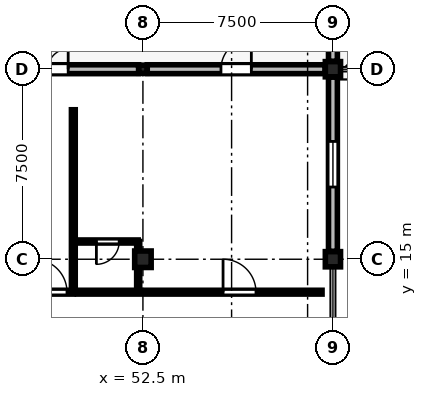
"""IFC4 building model, lengths in metres.
Left out: names, types, materials, properties, quantities, classifications, styles, units other than length and angle.
Written with IfcOpenShell. Run it as: python <this file> out.ifc"""

import sys

from ifc_helpers import new_model, si_unit, direction, frame, frame_2d, origin, origin_2d, place, context, subcontext, project, spatial, rectangle, extrude, element, fill, save


model = new_model("IFC4")
c1 = context("Model", 3, precision=1e-05, world=origin(), true_north=direction((0.0, 1.0)))
c2 = subcontext(c1, "Body", "Model", "MODEL_VIEW")
j1 = project(units=[si_unit("LENGTHUNIT", "METRE"), si_unit("PLANEANGLEUNIT", "RADIAN")], contexts=[c1])
p1 = place(None, origin())
s1 = spatial("IfcSite", under=j1, at=p1, CompositionType="ELEMENT")
p2 = place(p1, origin())
s2 = spatial("IfcBuilding", under=s1, at=p2, CompositionType="ELEMENT")
p3 = place(p2, frame((0.0, 0.0, 9.3)))
s3 = spatial("IfcBuildingStorey", under=s2, at=p3, CompositionType="ELEMENT", Elevation=9.3)
p4 = place(p3, frame((52.5, 15.0, 0.0), z_axis=(0.0, 0.0, 1.0), x_axis=(1.0, 0.0, 0.0)))
e1 = element("IfcColumn", 1, at=p4, inside=s3, PredefinedType="COLUMN", context=c2, shape_type="SweptSolid", body=[
    extrude(rectangle(XDim=0.65, YDim=0.65, at=origin_2d()), origin(), (0.0, 0.0, 1.0), 4.8),
])
p5 = place(p3, frame((52.5, 22.5, 0.0), z_axis=(0.0, 0.0, 1.0), x_axis=(1.0, 0.0, 0.0)))
e2 = element("IfcColumn", 2, at=p5, inside=s3, PredefinedType="COLUMN", context=c2, shape_type="SweptSolid", body=[
    extrude(rectangle(XDim=0.32, YDim=0.32, at=origin_2d()), origin(), (0.0, 0.0, 1.0), 4.8),
])
for number, where, z_axis, x_axis in (
    (3, (60.0, 15.0, 0.0), (0.0, 0.0, 1.0), (1.0, 0.0, 0.0)),
    (4, (60.0, 22.5, 0.0), (0.0, 0.0, 1.0), (1.0, 0.0, 0.0)),
):
    element("IfcColumn", number, at=place(p3, frame(where, z_axis=z_axis, x_axis=x_axis)), inside=s3, PredefinedType="COLUMN", context=c2, shape_type="SweptSolid", body=[
        extrude(rectangle(XDim=0.6, YDim=0.6, at=origin_2d()), origin(), (0.0, 0.0, 1.0), 4.8),
    ])
p6 = place(p3, frame((45.17, 22.5, 0.0), z_axis=(0.0, 0.0, 1.0), x_axis=(1.0, 0.0, 0.0)))
e5 = element("IfcWall", 5, at=p6, inside=s3, PredefinedType="STANDARD", context=c2, shape_type="SweptSolid", body=[
    extrude(rectangle(XDim=7.16, YDim=0.35, at=frame_2d((3.58, 0.0))), origin(), (0.0, 0.0, 1.0), 3.95),
])
p7 = place(p6, frame((2.78, 0.0, 0.0)))
e6 = element("IfcOpeningElement", 6, at=p7, cuts=e5, PredefinedType="OPENING", context=c2, shape_type="SweptSolid", body=[
    extrude(rectangle(XDim=1.6, YDim=2.35, at=frame_2d((0.8, 1.175))), frame((0.0, 0.185, 0.0), z_axis=(0.0, -1.0, 0.0), x_axis=(1.0, 0.0, 0.0)), (0.0, 0.0, 1.0), 0.37),
])
p8 = place(p3, frame((52.67, 22.5, 0.0), z_axis=(0.0, 0.0, 1.0), x_axis=(1.0, 0.0, 0.0)))
e7 = element("IfcWall", 7, at=p8, inside=s3, PredefinedType="STANDARD", context=c2, shape_type="SweptSolid", body=[
    extrude(rectangle(XDim=7.02, YDim=0.35, at=frame_2d((3.51, 0.0))), origin(), (0.0, 0.0, 1.0), 3.95),
])
p9 = place(p8, frame((2.91, 0.0, 0.0)))
e8 = element("IfcOpeningElement", 8, at=p9, cuts=e7, PredefinedType="OPENING", context=c2, shape_type="SweptSolid", body=[
    extrude(rectangle(XDim=1.2, YDim=2.3, at=frame_2d((0.6, 1.15))), frame((0.0, 0.185, 0.0), z_axis=(0.0, -1.0, 0.0), x_axis=(1.0, 0.0, 0.0)), (0.0, 0.0, 1.0), 0.37),
])
p10 = place(p3, frame((60.0, 22.19, 0.0), z_axis=(0.0, 0.0, 1.0), x_axis=(0.0, -1.0, 0.0)))
e9 = element("IfcWall", 9, at=p10, inside=s3, PredefinedType="STANDARD", context=c2, shape_type="SweptSolid", body=[
    extrude(rectangle(XDim=6.88, YDim=0.35, at=frame_2d((3.44, 0.0))), origin(), (0.0, 0.0, 1.0), 3.95),
])
p11 = place(p10, frame((2.54, 0.0, 0.9)))
e10 = element("IfcOpeningElement", 10, at=p11, cuts=e9, PredefinedType="OPENING", context=c2, shape_type="SweptSolid", body=[
    extrude(rectangle(XDim=1.8, YDim=2.4, at=frame_2d((0.9, 1.2))), frame((0.0, 0.185, 0.0), z_axis=(0.0, -1.0, 0.0), x_axis=(1.0, 0.0, 0.0)), (0.0, 0.0, 1.0), 0.37),
])
p12 = place(p3, frame((60.0, 22.81, 0.0), z_axis=(0.0, 0.0, 1.0), x_axis=(0.0, 1.0, 0.0)))
e11 = element("IfcWall", 11, at=p12, inside=s3, PredefinedType="STANDARD", context=c2, shape_type="SweptSolid", body=[
    extrude(rectangle(XDim=8.5, YDim=0.35, at=frame_2d((4.25, 0.0))), origin(), (0.0, 0.0, 1.0), 4.55),
])
p13 = place(p12, frame((3.45, 0.0, 0.0)))
e12 = element("IfcOpeningElement", 12, at=p13, cuts=e11, PredefinedType="OPENING", context=c2, shape_type="SweptSolid", body=[
    extrude(rectangle(XDim=1.6, YDim=2.35, at=frame_2d((0.8, 1.175))), frame((0.0, 0.185, 0.0), z_axis=(0.0, -1.0, 0.0), x_axis=(1.0, 0.0, 0.0)), (0.0, 0.0, 1.0), 0.37),
])
p14 = place(p3, frame((40.097, 13.7, 0.0), z_axis=(0.0, 0.0, 1.0), x_axis=(1.0, 0.0, 0.0)))
e13 = element("IfcWall", 13, at=p14, inside=s3, PredefinedType="PARTITIONING", context=c2, shape_type="SweptSolid", body=[
    extrude(rectangle(XDim=9.657, YDim=0.15, at=frame_2d((4.828, 0.0))), origin(), (0.0, 0.0, 1.0), 4.535),
])
p15 = place(p14, frame((8.107, 0.0, 0.0)))
e14 = element("IfcOpeningElement", 14, at=p15, cuts=e13, PredefinedType="OPENING", context=c2, shape_type="SweptSolid", body=[
    extrude(rectangle(XDim=1.3, YDim=2.2, at=frame_2d((0.65, 1.1))), frame((0.0, 0.085, 0.0), z_axis=(0.0, -1.0, 0.0), x_axis=(1.0, 0.0, 0.0)), (0.0, 0.0, 1.0), 0.17),
])
p16 = place(p3, frame((49.913, 13.7, 0.0), z_axis=(0.0, 0.0, 1.0), x_axis=(1.0, 0.0, 0.0)))
e15 = element("IfcWall", 15, at=p16, inside=s3, PredefinedType="PARTITIONING", context=c2, shape_type="SweptSolid", body=[
    extrude(rectangle(XDim=9.657, YDim=0.15, at=frame_2d((4.828, 0.0))), origin(), (0.0, 0.0, 1.0), 4.535),
])
p17 = place(p16, frame((5.75, 0.0, 0.0)))
e16 = element("IfcOpeningElement", 16, at=p17, cuts=e15, PredefinedType="OPENING", context=c2, shape_type="SweptSolid", body=[
    extrude(rectangle(XDim=1.3, YDim=2.2, at=frame_2d((0.65, 1.1))), frame((0.0, 0.085, 0.0), z_axis=(0.0, -1.0, 0.0), x_axis=(1.0, 0.0, 0.0)), (0.0, 0.0, 1.0), 0.17),
])
p18 = place(p3, frame((52.313, 15.7, 0.0), z_axis=(0.0, 0.0, 1.0), x_axis=(-1.0, 0.0, 0.0)))
e17 = element("IfcWall", 17, at=p18, inside=s3, PredefinedType="PARTITIONING", context=c2, shape_type="SweptSolid", body=[
    extrude(rectangle(XDim=2.4, YDim=0.12, at=frame_2d((1.2, 0.0))), origin(), (0.0, 0.0, 1.0), 4.535),
])
p19 = place(p18, frame((0.75, 0.0, 0.0)))
e18 = element("IfcOpeningElement", 18, at=p19, cuts=e17, PredefinedType="OPENING", context=c2, shape_type="SweptSolid", body=[
    extrude(rectangle(XDim=0.9, YDim=2.1, at=frame_2d((0.45, 1.05))), frame((0.0, 0.07, 0.0), z_axis=(0.0, -1.0, 0.0), x_axis=(1.0, 0.0, 0.0)), (0.0, 0.0, 1.0), 0.14),
])
p20 = place(p3, frame((52.313, 13.7, 0.0), z_axis=(0.0, 0.0, 1.0), x_axis=(0.0, 1.0, 0.0)))
e19 = element("IfcWall", 19, at=p20, inside=s3, PredefinedType="PARTITIONING", context=c2, shape_type="SweptSolid", body=[
    extrude(rectangle(XDim=2.0, YDim=0.12, at=frame_2d((1.0, 0.0))), origin(), (0.0, 0.0, 1.0), 3.985),
])
p21 = place(p3, frame((49.753, 13.7, 0.0), z_axis=(0.0, 0.0, 1.0), x_axis=(0.0, 1.0, 0.0)))
e20 = element("IfcWall", 20, at=p21, inside=s3, PredefinedType="PARTITIONING", context=c2, shape_type="SweptSolid", body=[
    extrude(rectangle(XDim=7.2, YDim=0.15, at=frame_2d((3.6, 0.0))), origin(), (0.0, 0.0, 1.0), 4.535),
])
p22 = place(p7, origin())
e21 = element("IfcDoor", 21, at=p22, inside=s3, OperationType="DOUBLE_DOOR_SINGLE_SWING", PredefinedType="DOOR", context=c2, shape_type="SweptSolid", body=[
    extrude(rectangle(XDim=1.6, YDim=2.35, at=frame_2d((0.8, 1.175))), frame((0.0, 0.025, 0.0), z_axis=(0.0, -1.0, 0.0), x_axis=(1.0, 0.0, 0.0)), (0.0, 0.0, 1.0), 0.05),
])
fill(e6, e21)
p23 = place(p9, origin())
e22 = element("IfcDoor", 22, at=p23, inside=s3, OperationType="SINGLE_SWING_RIGHT", PredefinedType="DOOR", context=c2, shape_type="SweptSolid", body=[
    extrude(rectangle(XDim=1.2, YDim=2.3, at=frame_2d((0.6, 1.15))), frame((0.0, 0.025, 0.0), z_axis=(0.0, -1.0, 0.0), x_axis=(1.0, 0.0, 0.0)), (0.0, 0.0, 1.0), 0.05),
])
fill(e8, e22)
p24 = place(p11, origin())
e23 = element("IfcWindow", 23, at=p24, inside=s3, PartitioningType="SINGLE_PANEL", PredefinedType="WINDOW", context=c2, shape_type="SweptSolid", body=[
    extrude(rectangle(XDim=1.8, YDim=2.4, at=frame_2d((0.9, 1.2))), frame((0.0, 0.03, 0.0), z_axis=(0.0, -1.0, 0.0), x_axis=(1.0, 0.0, 0.0)), (0.0, 0.0, 1.0), 0.06),
])
fill(e10, e23)
p25 = place(p15, origin())
e24 = element("IfcDoor", 24, at=p25, inside=s3, OperationType="SINGLE_SWING_LEFT", PredefinedType="DOOR", context=c2, shape_type="SweptSolid", body=[
    extrude(rectangle(XDim=1.3, YDim=2.2, at=frame_2d((0.65, 1.1))), frame((0.0, 0.025, 0.0), z_axis=(0.0, -1.0, 0.0), x_axis=(1.0, 0.0, 0.0)), (0.0, 0.0, 1.0), 0.05),
])
fill(e14, e24)
p26 = place(p17, origin())
e25 = element("IfcDoor", 25, at=p26, inside=s3, OperationType="SINGLE_SWING_LEFT", PredefinedType="DOOR", context=c2, shape_type="SweptSolid", body=[
    extrude(rectangle(XDim=1.3, YDim=2.2, at=frame_2d((0.65, 1.1))), frame((0.0, 0.025, 0.0), z_axis=(0.0, -1.0, 0.0), x_axis=(1.0, 0.0, 0.0)), (0.0, 0.0, 1.0), 0.05),
])
fill(e16, e25)
p27 = place(p19, origin())
e26 = element("IfcDoor", 26, at=p27, inside=s3, OperationType="SINGLE_SWING_RIGHT", PredefinedType="DOOR", context=c2, shape_type="SweptSolid", body=[
    extrude(rectangle(XDim=0.9, YDim=2.1, at=frame_2d((0.45, 1.05))), frame((0.0, 0.025, 0.0), z_axis=(0.0, -1.0, 0.0), x_axis=(1.0, 0.0, 0.0)), (0.0, 0.0, 1.0), 0.05),
])
fill(e18, e26)
save(model, sys.argv[1])
